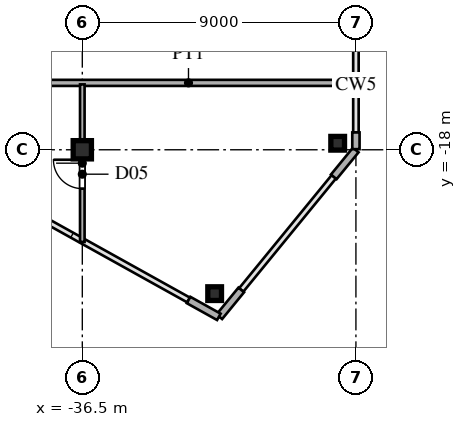
"""IFC4 building model, lengths in metres.
Left out: names, types, materials, properties, quantities, classifications, styles, units other than length and angle.
Written with IfcOpenShell. Run it as: python <this file> out.ifc"""

import sys

from ifc_helpers import new_model, si_unit, direction, frame, frame_2d, origin, origin_2d, place, context, subcontext, project, spatial, rectangle, hollow_rectangle, i_section, extrude, source, transform, mapped, element, fill, save


model = new_model("IFC4")
c1 = context("Model", 3, precision=1e-05, world=origin(), true_north=direction((0.0, 1.0)))
c2 = subcontext(c1, "Body", "Model", "MODEL_VIEW")
j1 = project(units=[si_unit("LENGTHUNIT", "METRE"), si_unit("PLANEANGLEUNIT", "RADIAN")], contexts=[c1])
p1 = place(None, origin())
s1 = spatial("IfcSite", under=j1, at=p1, CompositionType="ELEMENT")
p2 = place(p1, origin())
s2 = spatial("IfcBuilding", under=s1, at=p2, CompositionType="ELEMENT")
p3 = place(p2, frame((0.0, 0.0, 158.4)))
s3 = spatial("IfcBuildingStorey", under=s2, at=p3, CompositionType="ELEMENT", Elevation=158.4)
m1 = source(origin(), c2, "Body", "SweptSolid", [
    extrude(i_section(OverallWidth=0.6, OverallDepth=0.6, WebThickness=0.025, FlangeThickness=0.04, at=origin_2d()), origin(), (0.0, 0.0, 1.0), 3.6),
])
p4 = place(p3, frame((-36.5, -18.0, 0.0), z_axis=(0.0, 0.0, 1.0), x_axis=(1.0, 0.0, 0.0)))
e1 = element("IfcColumn", 1, at=p4, inside=s3, PredefinedType="COLUMN", context=c2, shape_type="MappedRepresentation", body=[
    mapped(m1, transform((0.0, 0.0, 0.0), scale=1.0)),
])
m2 = source(origin(), c2, "Body", "SweptSolid", [
    extrude(hollow_rectangle(XDim=0.45, YDim=0.45, WallThickness=0.018, at=origin_2d()), origin(), (0.0, 0.0, 1.0), 3.6),
])
for number, where, z_axis, x_axis in (
    (2, (-28.1, -17.786, 0.0), (0.0, 0.0, 1.0), (1.0, 0.0, 0.0)),
    (3, (-32.147, -22.732, 0.0), (0.0, 0.0, 1.0), (1.0, 0.0, 0.0)),
):
    element("IfcColumn", number, at=place(p3, frame(where, z_axis=z_axis, x_axis=x_axis)), inside=s3, PredefinedType="COLUMN", context=c2, shape_type="MappedRepresentation", body=[
        mapped(m2, transform((0.0, 0.0, 0.0), scale=1.0)),
    ])
p5 = place(p3, frame((-27.5, -17.98, 0.0), z_axis=(0.0, 0.0, 1.0), x_axis=(0.0, 1.0, 0.0)))
e4 = element("IfcWall", 4, at=p5, inside=s3, PredefinedType="SOLIDWALL", context=c2, shape_type="SweptSolid", body=[
    extrude(rectangle(XDim=0.55, YDim=0.24, at=frame_2d((0.275, 0.0))), origin(), (0.0, 0.0, 1.0), 3.34),
])
p6 = place(p3, frame((-33.005, -22.941, 0.0), z_axis=(0.0, 0.0, 1.0), x_axis=(0.87385402111, -0.486188389196, 0.0)))
e5 = element("IfcWall", 5, at=p6, inside=s3, PredefinedType="SOLIDWALL", context=c2, shape_type="SweptSolid", body=[
    extrude(rectangle(XDim=1.14, YDim=0.24, at=frame_2d((0.57, 0.0))), origin(), (0.0, 0.0, 1.0), 3.34),
])
for number, where, z_axis, x_axis in (
    (6, (-31.994, -23.492, 0.0), (0.0, 0.0, 1.0), (0.633, 0.774, 0.0)),
    (7, (-28.228, -18.89, 0.0), (0.0, 0.0, 1.0), (0.633, 0.774, 0.0)),
):
    element("IfcWall", number, at=place(p3, frame(where, z_axis=z_axis, x_axis=x_axis)), inside=s3, PredefinedType="SOLIDWALL", context=c2, shape_type="SweptSolid", body=[
        extrude(rectangle(XDim=1.14, YDim=0.24, at=frame_2d((0.57, 0.0))), origin(), (0.0, 0.0, 1.0), 3.34),
    ])
p7 = place(p3, frame((-38.515, -15.8, 0.0), z_axis=(0.0, 0.0, 1.0), x_axis=(1.0, 0.0, 0.0)))
e8 = element("IfcWall", 8, at=p7, inside=s3, PredefinedType="PARTITIONING", context=c2, shape_type="SweptSolid", body=[
    extrude(rectangle(XDim=11.015, YDim=0.2, at=frame_2d((5.507, 0.0))), origin(), (0.0, 0.0, 1.0), 3.34),
])
p8 = place(p3, frame((-36.5, -21.032, 0.0), z_axis=(0.0, 0.0, 1.0), x_axis=(0.0, 1.0, 0.0)))
e9 = element("IfcWall", 9, at=p8, inside=s3, PredefinedType="PARTITIONING", context=c2, shape_type="SweptSolid", body=[
    extrude(rectangle(XDim=3.012, YDim=0.15, at=frame_2d((1.506, 0.0))), origin(), (0.0, 0.0, 1.0), 3.34),
])
p9 = place(p8, frame((1.754, 0.0, 0.0)))
e10 = element("IfcOpeningElement", 10, at=p9, cuts=e9, PredefinedType="OPENING", context=c2, shape_type="SweptSolid", body=[
    extrude(rectangle(XDim=0.95, YDim=2.15, at=frame_2d((0.475, 1.075))), frame((0.0, 0.085, 0.0), z_axis=(0.0, -1.0, 0.0), x_axis=(1.0, 0.0, 0.0)), (0.0, 0.0, 1.0), 0.17),
])
p10 = place(p3, frame((-36.5, -18.02, 0.0), z_axis=(0.0, 0.0, 1.0), x_axis=(0.0, 1.0, 0.0)))
e11 = element("IfcWall", 11, at=p10, inside=s3, PredefinedType="PARTITIONING", context=c2, shape_type="SweptSolid", body=[
    extrude(rectangle(XDim=2.17, YDim=0.15, at=frame_2d((1.085, 0.0))), origin(), (0.0, 0.0, 1.0), 2.44),
])
m3 = source(origin(), c2, "Body", "SweptSolid", [
    extrude(rectangle(XDim=0.95, YDim=2.15, at=frame_2d((0.475, 1.075))), frame((0.0, 0.025, 0.0), z_axis=(0.0, -1.0, 0.0), x_axis=(1.0, 0.0, 0.0)), (0.0, 0.0, 1.0), 0.05),
])
p11 = place(p9, origin())
e12 = element("IfcDoor", 12, at=p11, inside=s3, OperationType="SINGLE_SWING_RIGHT", PredefinedType="DOOR", context=c2, shape_type="MappedRepresentation", body=[
    mapped(m3, transform((0.0, 0.0, 0.0), scale=1.0)),
])
fill(e10, e12)
save(model, sys.argv[1])
